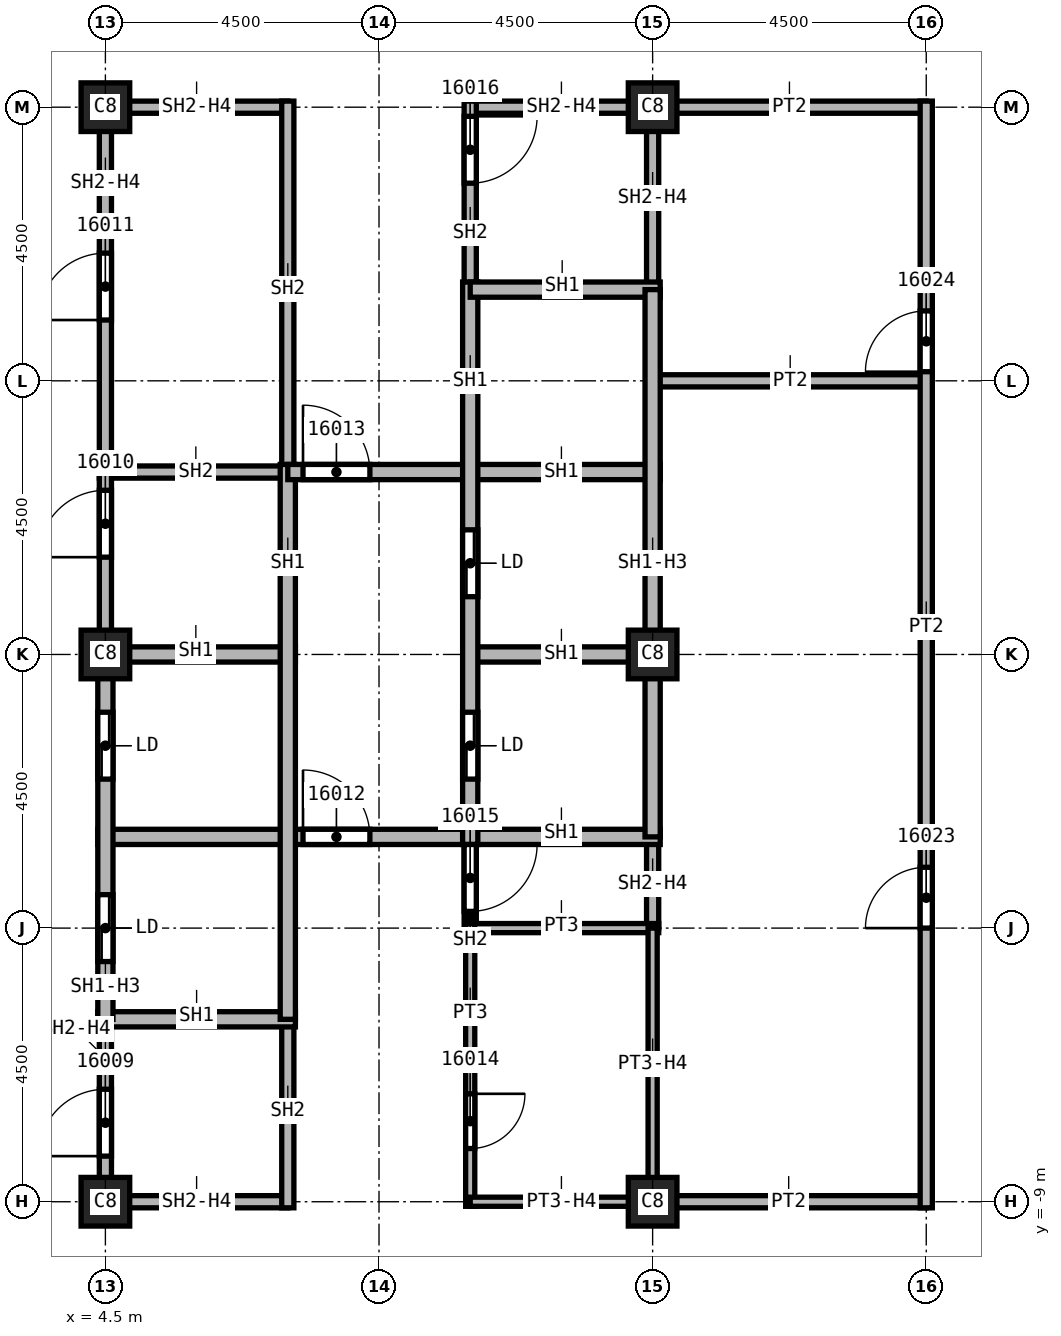
"""IFC4 building model, lengths in metres.
Left out: names, types, materials, properties, quantities, classifications, styles, units other than length and angle.
Written with IfcOpenShell. Run it as: python <this file> out.ifc"""

import sys

from ifc_helpers import new_model, si_unit, direction, frame, frame_2d, origin, origin_2d, place, context, subcontext, project, spatial, rectangle, extrude, element, fill, save


model = new_model("IFC4")
c1 = context("Model", 3, precision=1e-05, world=origin(), true_north=direction((0.0, 1.0)))
c2 = subcontext(c1, "Body", "Model", "MODEL_VIEW")
j1 = project(units=[si_unit("LENGTHUNIT", "METRE"), si_unit("PLANEANGLEUNIT", "RADIAN")], contexts=[c1])
p1 = place(None, origin())
s1 = spatial("IfcSite", under=j1, at=p1, CompositionType="ELEMENT")
p2 = place(p1, origin())
s2 = spatial("IfcBuilding", under=s1, at=p2, CompositionType="ELEMENT")
p3 = place(p2, frame((0.0, 0.0, 242.0)))
s3 = spatial("IfcBuildingStorey", under=s2, at=p3, CompositionType="ELEMENT", Elevation=242.0)
for number, where, z_axis, x_axis in (
    (1, (4.5, 0.0, 0.0), (0.0, 0.0, 1.0), (1.0, 0.0, 0.0)),
    (2, (4.5, 9.0, 0.0), (0.0, 0.0, 1.0), (1.0, 0.0, 0.0)),
    (3, (4.5, -9.0, 0.0), (0.0, 0.0, 1.0), (1.0, 0.0, 0.0)),
    (4, (13.5, 0.0, 0.0), (0.0, 0.0, 1.0), (1.0, 0.0, 0.0)),
    (5, (13.5, 9.0, 0.0), (0.0, 0.0, 1.0), (1.0, 0.0, 0.0)),
    (6, (13.5, -9.0, 0.0), (0.0, 0.0, 1.0), (1.0, 0.0, 0.0)),
):
    element("IfcColumn", number, at=place(p3, frame(where, z_axis=z_axis, x_axis=x_axis)), inside=s3, PredefinedType="COLUMN", context=c2, shape_type="SweptSolid", body=[
        extrude(rectangle(XDim=0.8, YDim=0.8, at=origin_2d()), origin(), (0.0, 0.0, 1.0), 3.72),
    ])
for number, where, z_axis, x_axis in (
    (7, (13.5, -9.0, 0.0), (0.0, 0.0, 1.0), (1.0, 0.0, 0.0)),
    (8, (13.5, 4.5, 0.0), (0.0, 0.0, 1.0), (1.0, 0.0, 0.0)),
    (9, (18.0, 9.0, 0.0), (0.0, 0.0, 1.0), (-1.0, 0.0, 0.0)),
):
    element("IfcWall", number, at=place(p3, frame(where, z_axis=z_axis, x_axis=x_axis)), inside=s3, PredefinedType="PARTITIONING", context=c2, shape_type="SweptSolid", body=[
        extrude(rectangle(XDim=4.5, YDim=0.2, at=frame_2d((2.25, 0.0))), origin(), (0.0, 0.0, 1.0), 3.72),
    ])
p4 = place(p3, frame((18.0, -9.1, 0.0), z_axis=(0.0, 0.0, 1.0), x_axis=(0.0, 1.0, 0.0)))
e10 = element("IfcWall", 10, at=p4, inside=s3, PredefinedType="PARTITIONING", context=c2, shape_type="SweptSolid", body=[
    extrude(rectangle(XDim=18.2, YDim=0.2, at=frame_2d((9.1, 0.0))), origin(), (0.0, 0.0, 1.0), 3.72),
])
p5 = place(p4, frame((4.6, 0.0, 0.0)))
e11 = element("IfcOpeningElement", 11, at=p5, cuts=e10, PredefinedType="OPENING", context=c2, shape_type="SweptSolid", body=[
    extrude(rectangle(XDim=1.0, YDim=2.1, at=frame_2d((0.5, 1.05))), frame((0.0, 0.1, 0.0), z_axis=(0.0, -1.0, 0.0), x_axis=(1.0, 0.0, 0.0)), (0.0, 0.0, 1.0), 0.2),
])
p6 = place(p4, frame((13.75, 0.0, 0.0)))
e12 = element("IfcOpeningElement", 12, at=p6, cuts=e10, PredefinedType="OPENING", context=c2, shape_type="SweptSolid", body=[
    extrude(rectangle(XDim=1.0, YDim=2.1, at=frame_2d((0.5, 1.05))), frame((0.0, 0.1, 0.0), z_axis=(0.0, -1.0, 0.0), x_axis=(1.0, 0.0, 0.0)), (0.0, 0.0, 1.0), 0.2),
])
p7 = place(p3, frame((4.4, 3.0, 0.0), z_axis=(0.0, 0.0, 1.0), x_axis=(1.0, 0.0, 0.0)))
e13 = element("IfcWall", 13, at=p7, inside=s3, PredefinedType="SOLIDWALL", context=c2, shape_type="SweptSolid", body=[
    extrude(rectangle(XDim=3.225, YDim=0.2, at=frame_2d((1.613, 0.0))), origin(), (0.0, 0.0, 1.0), 3.72),
])
p8 = place(p3, frame((4.5, -9.1, 0.0), z_axis=(0.0, 0.0, 1.0), x_axis=(0.0, 1.0, 0.0)))
e14 = element("IfcWall", 14, at=p8, inside=s3, PredefinedType="SOLIDWALL", context=c2, shape_type="SweptSolid", body=[
    extrude(rectangle(XDim=3.1, YDim=0.2, at=frame_2d((1.55, 0.0))), origin(), (0.0, 0.0, 1.0), 3.042),
])
p9 = place(p8, frame((0.85, 0.0, 0.0)))
e15 = element("IfcOpeningElement", 15, at=p9, cuts=e14, PredefinedType="OPENING", context=c2, shape_type="SweptSolid", body=[
    extrude(rectangle(XDim=1.1, YDim=2.1, at=frame_2d((0.55, 1.05))), frame((0.0, 0.1, 0.0), z_axis=(0.0, -1.0, 0.0), x_axis=(1.0, 0.0, 0.0)), (0.0, 0.0, 1.0), 0.2),
])
p10 = place(p3, frame((4.5, 0.0, 0.0), z_axis=(0.0, 0.0, 1.0), x_axis=(0.0, 1.0, 0.0)))
e16 = element("IfcWall", 16, at=p10, inside=s3, PredefinedType="SOLIDWALL", context=c2, shape_type="SweptSolid", body=[
    extrude(rectangle(XDim=9.1, YDim=0.2, at=frame_2d((4.55, 0.0))), origin(), (0.0, 0.0, 1.0), 3.042),
])
p11 = place(p10, frame((1.6, 0.0, 0.0)))
e17 = element("IfcOpeningElement", 17, at=p11, cuts=e16, PredefinedType="OPENING", context=c2, shape_type="SweptSolid", body=[
    extrude(rectangle(XDim=1.1, YDim=2.1, at=frame_2d((0.55, 1.05))), frame((0.0, 0.1, 0.0), z_axis=(0.0, -1.0, 0.0), x_axis=(1.0, 0.0, 0.0)), (0.0, 0.0, 1.0), 0.2),
])
p12 = place(p10, frame((5.5, 0.0, 0.0)))
e18 = element("IfcOpeningElement", 18, at=p12, cuts=e16, PredefinedType="OPENING", context=c2, shape_type="SweptSolid", body=[
    extrude(rectangle(XDim=1.1, YDim=2.1, at=frame_2d((0.55, 1.05))), frame((0.0, 0.1, 0.0), z_axis=(0.0, -1.0, 0.0), x_axis=(1.0, 0.0, 0.0)), (0.0, 0.0, 1.0), 0.2),
])
for number, where, z_axis, x_axis in (
    (19, (4.5, 9.0, 0.0), (0.0, 0.0, 1.0), (1.0, 0.0, 0.0)),
    (20, (7.5, -9.0, 0.0), (0.0, 0.0, 1.0), (-1.0, 0.0, 0.0)),
):
    element("IfcWall", number, at=place(p3, frame(where, z_axis=z_axis, x_axis=x_axis)), inside=s3, PredefinedType="SOLIDWALL", context=c2, shape_type="SweptSolid", body=[
        extrude(rectangle(XDim=3.0, YDim=0.2, at=frame_2d((1.5, 0.0))), origin(), (0.0, 0.0, 1.0), 3.042),
    ])
p13 = place(p3, frame((7.5, -6.0, 0.0), z_axis=(0.0, 0.0, 1.0), x_axis=(0.0, -1.0, 0.0)))
e21 = element("IfcWall", 21, at=p13, inside=s3, PredefinedType="SOLIDWALL", context=c2, shape_type="SweptSolid", body=[
    extrude(rectangle(XDim=3.1, YDim=0.2, at=frame_2d((1.55, 0.0))), origin(), (0.0, 0.0, 1.0), 3.72),
])
p14 = place(p3, frame((7.5, 9.1, 0.0), z_axis=(0.0, 0.0, 1.0), x_axis=(0.0, -1.0, 0.0)))
e22 = element("IfcWall", 22, at=p14, inside=s3, PredefinedType="SOLIDWALL", context=c2, shape_type="SweptSolid", body=[
    extrude(rectangle(XDim=6.225, YDim=0.2, at=frame_2d((3.113, 0.0))), origin(), (0.0, 0.0, 1.0), 3.72),
])
p15 = place(p3, frame((10.5, -2.875, 0.0), z_axis=(0.0, 0.0, 1.0), x_axis=(0.0, -1.0, 0.0)))
e23 = element("IfcWall", 23, at=p15, inside=s3, PredefinedType="SOLIDWALL", context=c2, shape_type="SweptSolid", body=[
    extrude(rectangle(XDim=1.7, YDim=0.2, at=frame_2d((0.85, 0.0))), origin(), (0.0, 0.0, 1.0), 3.72),
])
p16 = place(p15, frame((0.25, 0.0, 0.0)))
e24 = element("IfcOpeningElement", 24, at=p16, cuts=e23, PredefinedType="OPENING", context=c2, shape_type="SweptSolid", body=[
    extrude(rectangle(XDim=1.1, YDim=2.1, at=frame_2d((0.55, 1.05))), frame((0.0, 0.1, 0.0), z_axis=(0.0, -1.0, 0.0), x_axis=(1.0, 0.0, 0.0)), (0.0, 0.0, 1.0), 0.2),
])
p17 = place(p3, frame((10.5, 9.0, 0.0), z_axis=(0.0, 0.0, 1.0), x_axis=(1.0, 0.0, 0.0)))
e25 = element("IfcWall", 25, at=p17, inside=s3, PredefinedType="SOLIDWALL", context=c2, shape_type="SweptSolid", body=[
    extrude(rectangle(XDim=3.1, YDim=0.2, at=frame_2d((1.55, 0.0))), origin(), (0.0, 0.0, 1.0), 3.042),
])
p18 = place(p3, frame((10.5, 9.1, 0.0), z_axis=(0.0, 0.0, 1.0), x_axis=(0.0, -1.0, 0.0)))
e26 = element("IfcWall", 26, at=p18, inside=s3, PredefinedType="SOLIDWALL", context=c2, shape_type="SweptSolid", body=[
    extrude(rectangle(XDim=3.225, YDim=0.2, at=frame_2d((1.613, 0.0))), origin(), (0.0, 0.0, 1.0), 3.72),
])
p19 = place(p18, frame((0.25, 0.0, 0.0)))
e27 = element("IfcOpeningElement", 27, at=p19, cuts=e26, PredefinedType="OPENING", context=c2, shape_type="SweptSolid", body=[
    extrude(rectangle(XDim=1.1, YDim=2.1, at=frame_2d((0.55, 1.05))), frame((0.0, 0.1, 0.0), z_axis=(0.0, -1.0, 0.0), x_axis=(1.0, 0.0, 0.0)), (0.0, 0.0, 1.0), 0.2),
])
p20 = place(p3, frame((13.5, -3.0, 0.0), z_axis=(0.0, 0.0, 1.0), x_axis=(0.0, -1.0, 0.0)))
e28 = element("IfcWall", 28, at=p20, inside=s3, PredefinedType="SOLIDWALL", context=c2, shape_type="SweptSolid", body=[
    extrude(rectangle(XDim=1.5, YDim=0.2, at=frame_2d((0.75, 0.0))), origin(), (0.0, 0.0, 1.0), 3.042),
])
p21 = place(p3, frame((13.5, 9.1, 0.0), z_axis=(0.0, 0.0, 1.0), x_axis=(0.0, -1.0, 0.0)))
e29 = element("IfcWall", 29, at=p21, inside=s3, PredefinedType="SOLIDWALL", context=c2, shape_type="SweptSolid", body=[
    extrude(rectangle(XDim=3.1, YDim=0.2, at=frame_2d((1.55, 0.0))), origin(), (0.0, 0.0, 1.0), 3.042),
])
p22 = place(p3, frame((4.375, -6.0, 0.0), z_axis=(0.0, 0.0, 1.0), x_axis=(1.0, 0.0, 0.0)))
e30 = element("IfcWall", 30, at=p22, inside=s3, PredefinedType="SOLIDWALL", context=c2, shape_type="SweptSolid", body=[
    extrude(rectangle(XDim=3.25, YDim=0.25, at=frame_2d((1.625, 0.0))), origin(), (0.0, 0.0, 1.0), 3.72),
])
p23 = place(p3, frame((4.375, -3.0, 0.0), z_axis=(0.0, 0.0, 1.0), x_axis=(1.0, 0.0, 0.0)))
e31 = element("IfcWall", 31, at=p23, inside=s3, PredefinedType="SOLIDWALL", context=c2, shape_type="SweptSolid", body=[
    extrude(rectangle(XDim=9.25, YDim=0.25, at=frame_2d((4.625, 0.0))), origin(), (0.0, 0.0, 1.0), 3.72),
])
p24 = place(p23, frame((3.375, 0.0, 0.0)))
e32 = element("IfcOpeningElement", 32, at=p24, cuts=e31, PredefinedType="OPENING", context=c2, shape_type="SweptSolid", body=[
    extrude(rectangle(XDim=1.1, YDim=2.1, at=frame_2d((0.55, 1.05))), frame((0.0, 0.125, 0.0), z_axis=(0.0, -1.0, 0.0), x_axis=(1.0, 0.0, 0.0)), (0.0, 0.0, 1.0), 0.25),
])
p25 = place(p3, frame((4.375, 0.0, 0.0), z_axis=(0.0, 0.0, 1.0), x_axis=(1.0, 0.0, 0.0)))
e33 = element("IfcWall", 33, at=p25, inside=s3, PredefinedType="SOLIDWALL", context=c2, shape_type="SweptSolid", body=[
    extrude(rectangle(XDim=3.25, YDim=0.25, at=frame_2d((1.625, 0.0))), origin(), (0.0, 0.0, 1.0), 3.72),
])
p26 = place(p3, frame((4.5, -6.0, 0.0), z_axis=(0.0, 0.0, 1.0), x_axis=(0.0, 1.0, 0.0)))
e34 = element("IfcWall", 34, at=p26, inside=s3, PredefinedType="SOLIDWALL", context=c2, shape_type="SweptSolid", body=[
    extrude(rectangle(XDim=6.0, YDim=0.25, at=frame_2d((3.0, 0.0))), origin(), (0.0, 0.0, 1.0), 3.042),
])
p27 = place(p26, frame((0.95, 0.0, 0.0)))
e35 = element("IfcOpeningElement", 35, at=p27, cuts=e34, PredefinedType="OPENING", context=c2, shape_type="SweptSolid", body=[
    extrude(rectangle(XDim=1.1, YDim=2.1, at=frame_2d((0.55, 1.05))), frame((0.0, 0.125, 0.0), z_axis=(0.0, -1.0, 0.0), x_axis=(1.0, 0.0, 0.0)), (0.0, 0.0, 1.0), 0.25),
])
p28 = place(p26, frame((3.95, 0.0, 0.0)))
e36 = element("IfcOpeningElement", 36, at=p28, cuts=e34, PredefinedType="OPENING", context=c2, shape_type="SweptSolid", body=[
    extrude(rectangle(XDim=1.1, YDim=2.1, at=frame_2d((0.55, 1.05))), frame((0.0, 0.125, 0.0), z_axis=(0.0, -1.0, 0.0), x_axis=(1.0, 0.0, 0.0)), (0.0, 0.0, 1.0), 0.25),
])
p29 = place(p3, frame((7.5, 3.125, 0.0), z_axis=(0.0, 0.0, 1.0), x_axis=(0.0, -1.0, 0.0)))
e37 = element("IfcWall", 37, at=p29, inside=s3, PredefinedType="SOLIDWALL", context=c2, shape_type="SweptSolid", body=[
    extrude(rectangle(XDim=9.125, YDim=0.25, at=frame_2d((4.562, 0.0))), origin(), (0.0, 0.0, 1.0), 3.72),
])
p30 = place(p3, frame((7.5, 3.0, 0.0), z_axis=(0.0, 0.0, 1.0), x_axis=(1.0, 0.0, 0.0)))
e38 = element("IfcWall", 38, at=p30, inside=s3, PredefinedType="SOLIDWALL", context=c2, shape_type="SweptSolid", body=[
    extrude(rectangle(XDim=6.125, YDim=0.25, at=frame_2d((3.062, 0.0))), origin(), (0.0, 0.0, 1.0), 3.72),
])
p31 = place(p30, frame((0.25, 0.0, 0.0)))
e39 = element("IfcOpeningElement", 39, at=p31, cuts=e38, PredefinedType="OPENING", context=c2, shape_type="SweptSolid", body=[
    extrude(rectangle(XDim=1.1, YDim=2.1, at=frame_2d((0.55, 1.05))), frame((0.0, 0.125, 0.0), z_axis=(0.0, -1.0, 0.0), x_axis=(1.0, 0.0, 0.0)), (0.0, 0.0, 1.0), 0.25),
])
p32 = place(p3, frame((10.5, 0.0, 0.0), z_axis=(0.0, 0.0, 1.0), x_axis=(1.0, 0.0, 0.0)))
e40 = element("IfcWall", 40, at=p32, inside=s3, PredefinedType="SOLIDWALL", context=c2, shape_type="SweptSolid", body=[
    extrude(rectangle(XDim=3.125, YDim=0.25, at=frame_2d((1.562, 0.0))), origin(), (0.0, 0.0, 1.0), 3.72),
])
p33 = place(p3, frame((10.5, 6.125, 0.0), z_axis=(0.0, 0.0, 1.0), x_axis=(0.0, -1.0, 0.0)))
e41 = element("IfcWall", 41, at=p33, inside=s3, PredefinedType="SOLIDWALL", context=c2, shape_type="SweptSolid", body=[
    extrude(rectangle(XDim=9.25, YDim=0.25, at=frame_2d((4.625, 0.0))), origin(), (0.0, 0.0, 1.0), 3.72),
])
p34 = place(p33, frame((7.075, 0.0, 0.0)))
e42 = element("IfcOpeningElement", 42, at=p34, cuts=e41, PredefinedType="OPENING", context=c2, shape_type="SweptSolid", body=[
    extrude(rectangle(XDim=1.1, YDim=2.1, at=frame_2d((0.55, 1.05))), frame((0.0, 0.125, 0.0), z_axis=(0.0, -1.0, 0.0), x_axis=(1.0, 0.0, 0.0)), (0.0, 0.0, 1.0), 0.25),
])
p35 = place(p33, frame((4.075, 0.0, 0.0)))
e43 = element("IfcOpeningElement", 43, at=p35, cuts=e41, PredefinedType="OPENING", context=c2, shape_type="SweptSolid", body=[
    extrude(rectangle(XDim=1.1, YDim=2.1, at=frame_2d((0.55, 1.05))), frame((0.0, 0.125, 0.0), z_axis=(0.0, -1.0, 0.0), x_axis=(1.0, 0.0, 0.0)), (0.0, 0.0, 1.0), 0.25),
])
p36 = place(p3, frame((10.5, 6.0, 0.0), z_axis=(0.0, 0.0, 1.0), x_axis=(1.0, 0.0, 0.0)))
e44 = element("IfcWall", 44, at=p36, inside=s3, PredefinedType="SOLIDWALL", context=c2, shape_type="SweptSolid", body=[
    extrude(rectangle(XDim=3.125, YDim=0.25, at=frame_2d((1.562, 0.0))), origin(), (0.0, 0.0, 1.0), 3.72),
])
p37 = place(p3, frame((13.5, 6.0, 0.0), z_axis=(0.0, 0.0, 1.0), x_axis=(0.0, -1.0, 0.0)))
e45 = element("IfcWall", 45, at=p37, inside=s3, PredefinedType="SOLIDWALL", context=c2, shape_type="SweptSolid", body=[
    extrude(rectangle(XDim=9.0, YDim=0.25, at=frame_2d((4.5, 0.0))), origin(), (0.0, 0.0, 1.0), 3.042),
])
p38 = place(p3, frame((10.5, -4.5, 0.0), z_axis=(0.0, 0.0, 1.0), x_axis=(1.0, 0.0, 0.0)))
e46 = element("IfcWall", 46, at=p38, inside=s3, PredefinedType="PARTITIONING", context=c2, shape_type="SweptSolid", body=[
    extrude(rectangle(XDim=3.1, YDim=0.15, at=frame_2d((1.55, 0.0))), origin(), (0.0, 0.0, 1.0), 3.72),
])
p39 = place(p3, frame((10.5, -4.425, 0.0), z_axis=(0.0, 0.0, 1.0), x_axis=(0.0, -1.0, 0.0)))
e47 = element("IfcWall", 47, at=p39, inside=s3, PredefinedType="PARTITIONING", context=c2, shape_type="SweptSolid", body=[
    extrude(rectangle(XDim=4.65, YDim=0.15, at=frame_2d((2.325, 0.0))), origin(), (0.0, 0.0, 1.0), 3.72),
])
p40 = place(p39, frame((2.8, 0.0, 0.0)))
e48 = element("IfcOpeningElement", 48, at=p40, cuts=e47, PredefinedType="OPENING", context=c2, shape_type="SweptSolid", body=[
    extrude(rectangle(XDim=0.9, YDim=2.1, at=frame_2d((0.45, 1.05))), frame((0.0, 0.075, 0.0), z_axis=(0.0, -1.0, 0.0), x_axis=(1.0, 0.0, 0.0)), (0.0, 0.0, 1.0), 0.15),
])
p41 = place(p3, frame((13.5, -4.5, 0.0), z_axis=(0.0, 0.0, 1.0), x_axis=(0.0, -1.0, 0.0)))
e49 = element("IfcWall", 49, at=p41, inside=s3, PredefinedType="PARTITIONING", context=c2, shape_type="SweptSolid", body=[
    extrude(rectangle(XDim=4.6, YDim=0.15, at=frame_2d((2.3, 0.0))), origin(), (0.0, 0.0, 1.0), 3.042),
])
p42 = place(p3, frame((13.575, -9.0, 0.0), z_axis=(0.0, 0.0, 1.0), x_axis=(-1.0, 0.0, 0.0)))
e50 = element("IfcWall", 50, at=p42, inside=s3, PredefinedType="PARTITIONING", context=c2, shape_type="SweptSolid", body=[
    extrude(rectangle(XDim=3.075, YDim=0.15, at=frame_2d((1.538, 0.0))), origin(), (0.0, 0.0, 1.0), 3.042),
])
p43 = place(p9, origin())
e51 = element("IfcDoor", 51, at=p43, inside=s3, OperationType="SINGLE_SWING_RIGHT", PredefinedType="DOOR", context=c2, shape_type="SweptSolid", body=[
    extrude(rectangle(XDim=1.1, YDim=2.1, at=frame_2d((0.55, 1.05))), frame((0.0, 0.025, 0.0), z_axis=(0.0, -1.0, 0.0), x_axis=(1.0, 0.0, 0.0)), (0.0, 0.0, 1.0), 0.05),
])
fill(e15, e51)
p44 = place(p11, origin())
e52 = element("IfcDoor", 52, at=p44, inside=s3, OperationType="SINGLE_SWING_LEFT", PredefinedType="DOOR", context=c2, shape_type="SweptSolid", body=[
    extrude(rectangle(XDim=1.1, YDim=2.1, at=frame_2d((0.55, 1.05))), frame((0.0, 0.025, 0.0), z_axis=(0.0, -1.0, 0.0), x_axis=(1.0, 0.0, 0.0)), (0.0, 0.0, 1.0), 0.05),
])
fill(e17, e52)
p45 = place(p12, origin())
e53 = element("IfcDoor", 53, at=p45, inside=s3, OperationType="SINGLE_SWING_RIGHT", PredefinedType="DOOR", context=c2, shape_type="SweptSolid", body=[
    extrude(rectangle(XDim=1.1, YDim=2.1, at=frame_2d((0.55, 1.05))), frame((0.0, 0.025, 0.0), z_axis=(0.0, -1.0, 0.0), x_axis=(1.0, 0.0, 0.0)), (0.0, 0.0, 1.0), 0.05),
])
fill(e18, e53)
p46 = place(p24, origin())
e54 = element("IfcDoor", 54, at=p46, inside=s3, OperationType="SINGLE_SWING_LEFT", PredefinedType="DOOR", context=c2, shape_type="SweptSolid", body=[
    extrude(rectangle(XDim=1.1, YDim=2.1, at=frame_2d((0.55, 1.05))), frame((0.0, 0.025, 0.0), z_axis=(0.0, -1.0, 0.0), x_axis=(1.0, 0.0, 0.0)), (0.0, 0.0, 1.0), 0.05),
])
fill(e32, e54)
p47 = place(p31, origin())
e55 = element("IfcDoor", 55, at=p47, inside=s3, OperationType="SINGLE_SWING_RIGHT", PredefinedType="DOOR", context=c2, shape_type="SweptSolid", body=[
    extrude(rectangle(XDim=1.1, YDim=2.1, at=frame_2d((0.55, 1.05))), frame((0.0, 0.025, 0.0), z_axis=(0.0, -1.0, 0.0), x_axis=(1.0, 0.0, 0.0)), (0.0, 0.0, 1.0), 0.05),
])
fill(e39, e55)
p48 = place(p40, origin())
e56 = element("IfcDoor", 56, at=p48, inside=s3, OperationType="SINGLE_SWING_LEFT", PredefinedType="DOOR", context=c2, shape_type="SweptSolid", body=[
    extrude(rectangle(XDim=0.9, YDim=2.1, at=frame_2d((0.45, 1.05))), frame((0.0, 0.025, 0.0), z_axis=(0.0, -1.0, 0.0), x_axis=(1.0, 0.0, 0.0)), (0.0, 0.0, 1.0), 0.05),
])
fill(e48, e56)
p49 = place(p16, origin())
e57 = element("IfcDoor", 57, at=p49, inside=s3, OperationType="SINGLE_SWING_RIGHT", PredefinedType="DOOR", context=c2, shape_type="SweptSolid", body=[
    extrude(rectangle(XDim=1.1, YDim=2.1, at=frame_2d((0.55, 1.05))), frame((0.0, 0.025, 0.0), z_axis=(0.0, -1.0, 0.0), x_axis=(1.0, 0.0, 0.0)), (0.0, 0.0, 1.0), 0.05),
])
fill(e24, e57)
p50 = place(p19, origin())
e58 = element("IfcDoor", 58, at=p50, inside=s3, OperationType="SINGLE_SWING_LEFT", PredefinedType="DOOR", context=c2, shape_type="SweptSolid", body=[
    extrude(rectangle(XDim=1.1, YDim=2.1, at=frame_2d((0.55, 1.05))), frame((0.0, 0.025, 0.0), z_axis=(0.0, -1.0, 0.0), x_axis=(1.0, 0.0, 0.0)), (0.0, 0.0, 1.0), 0.05),
])
fill(e27, e58)
p51 = place(p5, origin())
e59 = element("IfcDoor", 59, at=p51, inside=s3, OperationType="SINGLE_SWING_RIGHT", PredefinedType="DOOR", context=c2, shape_type="SweptSolid", body=[
    extrude(rectangle(XDim=1.0, YDim=2.1, at=frame_2d((0.5, 1.05))), frame((0.0, 0.025, 0.0), z_axis=(0.0, -1.0, 0.0), x_axis=(1.0, 0.0, 0.0)), (0.0, 0.0, 1.0), 0.05),
])
fill(e11, e59)
p52 = place(p6, origin())
e60 = element("IfcDoor", 60, at=p52, inside=s3, OperationType="SINGLE_SWING_LEFT", PredefinedType="DOOR", context=c2, shape_type="SweptSolid", body=[
    extrude(rectangle(XDim=1.0, YDim=2.1, at=frame_2d((0.5, 1.05))), frame((0.0, 0.025, 0.0), z_axis=(0.0, -1.0, 0.0), x_axis=(1.0, 0.0, 0.0)), (0.0, 0.0, 1.0), 0.05),
])
fill(e12, e60)
p53 = place(p27, origin())
e61 = element("IfcDoor", 61, at=p53, inside=s3, OperationType="SLIDING_TO_LEFT", PredefinedType="DOOR", context=c2, shape_type="SweptSolid", body=[
    extrude(rectangle(XDim=1.1, YDim=2.1, at=frame_2d((0.55, 1.05))), frame((0.0, 0.025, 0.0), z_axis=(0.0, -1.0, 0.0), x_axis=(1.0, 0.0, 0.0)), (0.0, 0.0, 1.0), 0.05),
])
fill(e35, e61)
p54 = place(p28, origin())
e62 = element("IfcDoor", 62, at=p54, inside=s3, OperationType="SLIDING_TO_LEFT", PredefinedType="DOOR", context=c2, shape_type="SweptSolid", body=[
    extrude(rectangle(XDim=1.1, YDim=2.1, at=frame_2d((0.55, 1.05))), frame((0.0, 0.025, 0.0), z_axis=(0.0, -1.0, 0.0), x_axis=(1.0, 0.0, 0.0)), (0.0, 0.0, 1.0), 0.05),
])
fill(e36, e62)
p55 = place(p34, origin())
e63 = element("IfcDoor", 63, at=p55, inside=s3, OperationType="SLIDING_TO_LEFT", PredefinedType="DOOR", context=c2, shape_type="SweptSolid", body=[
    extrude(rectangle(XDim=1.1, YDim=2.1, at=frame_2d((0.55, 1.05))), frame((0.0, 0.025, 0.0), z_axis=(0.0, -1.0, 0.0), x_axis=(1.0, 0.0, 0.0)), (0.0, 0.0, 1.0), 0.05),
])
fill(e42, e63)
p56 = place(p35, origin())
e64 = element("IfcDoor", 64, at=p56, inside=s3, OperationType="SLIDING_TO_LEFT", PredefinedType="DOOR", context=c2, shape_type="SweptSolid", body=[
    extrude(rectangle(XDim=1.1, YDim=2.1, at=frame_2d((0.55, 1.05))), frame((0.0, 0.025, 0.0), z_axis=(0.0, -1.0, 0.0), x_axis=(1.0, 0.0, 0.0)), (0.0, 0.0, 1.0), 0.05),
])
fill(e43, e64)
save(model, sys.argv[1])
